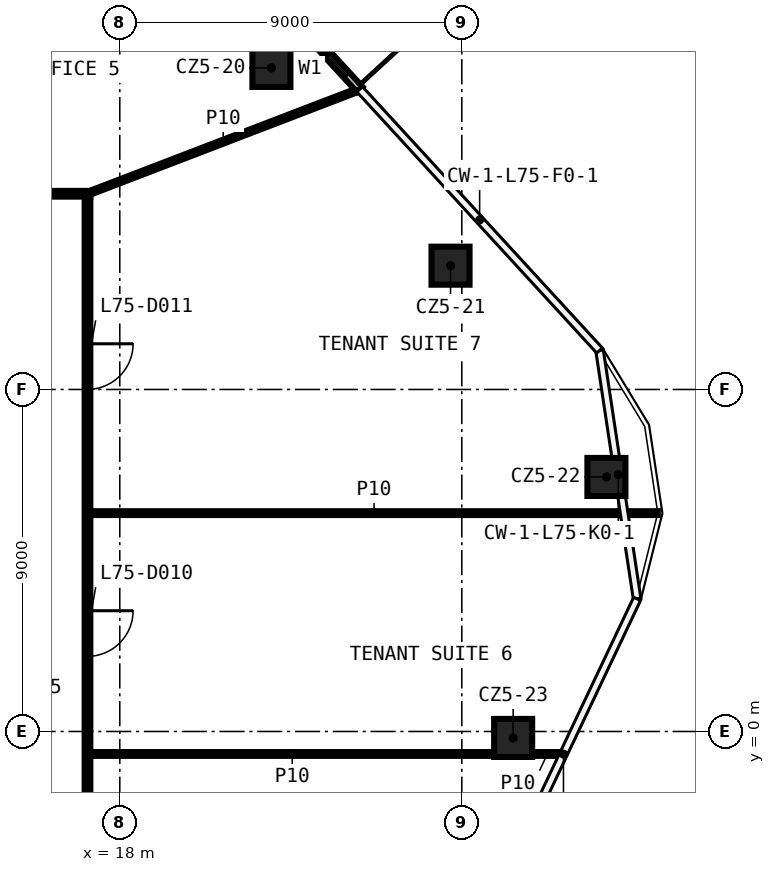
"""IFC4 building model, lengths in metres.
Left out: names, types, materials, properties, quantities, classifications, styles, units other than length and angle.
Written with IfcOpenShell. Run it as: python <this file> out.ifc"""

import sys

from ifc_helpers import new_model, si_unit, direction, frame, frame_2d, origin, origin_2d, place, context, subcontext, project, spatial, rectangle, extrude, element, fill, save


model = new_model("IFC4")
c1 = context("Model", 3, precision=1e-05, world=origin(), true_north=direction((0.0, 1.0)))
c2 = subcontext(c1, "Body", "Model", "MODEL_VIEW")
j1 = project(units=[si_unit("LENGTHUNIT", "METRE"), si_unit("PLANEANGLEUNIT", "RADIAN")], contexts=[c1])
p1 = place(None, origin())
s1 = spatial("IfcSite", under=j1, at=p1, CompositionType="ELEMENT")
p2 = place(p1, origin())
s2 = spatial("IfcBuilding", under=s1, at=p2, CompositionType="ELEMENT")
p3 = place(p2, frame((0.0, 0.0, 348.8)))
s3 = spatial("IfcBuildingStorey", under=s2, at=p3, CompositionType="ELEMENT", Elevation=348.8)
for number, where, z_axis, x_axis in (
    (1, (21.99, 17.462, 0.0), (0.0, 0.0, 1.0), (1.0, 0.0, 0.0)),
    (2, (26.703, 12.257, 0.0), (0.0, 0.0, 1.0), (1.0, 0.0, 0.0)),
    (3, (30.805, 6.698, 0.0), (0.0, 0.0, 1.0), (1.0, 0.0, 0.0)),
    (4, (28.351, -0.17, 0.0), (0.0, 0.0, 1.0), (1.0, 0.0, 0.0)),
):
    element("IfcColumn", number, at=place(p3, frame(where, z_axis=z_axis, x_axis=x_axis)), inside=s3, PredefinedType="COLUMN", context=c2, shape_type="SweptSolid", body=[
        extrude(rectangle(XDim=1.0, YDim=1.0, at=origin_2d()), origin(), (0.0, 0.0, 1.0), 3.7),
    ])
p4 = place(p3, frame((17.225, -0.592, 0.0), z_axis=(0.0, 0.0, 1.0), x_axis=(1.0, 0.0, 0.0)))
e5 = element("IfcWall", 5, at=p4, inside=s3, PredefinedType="PARTITIONING", context=c2, shape_type="SweptSolid", body=[
    extrude(rectangle(XDim=10.626, YDim=0.1, at=frame_2d((5.313, 0.0))), origin(), (0.0, 0.0, 1.0), 3.7),
])
p5 = place(p3, frame((28.851, -0.592, 0.0), z_axis=(0.0, 0.0, 1.0), x_axis=(1.0, 0.0, 0.0)))
e6 = element("IfcWall", 6, at=p5, inside=s3, PredefinedType="PARTITIONING", context=c2, shape_type="SweptSolid", body=[
    extrude(rectangle(XDim=0.803, YDim=0.1, at=frame_2d((0.402, 0.0))), origin(), (0.0, 0.0, 1.0), 3.7),
])
p6 = place(p3, frame((17.225, 5.746, 0.0), z_axis=(0.0, 0.0, 1.0), x_axis=(1.0, 0.0, 0.0)))
e7 = element("IfcWall", 7, at=p6, inside=s3, PredefinedType="PARTITIONING", context=c2, shape_type="SweptSolid", body=[
    extrude(rectangle(XDim=14.931, YDim=0.1, at=frame_2d((7.466, 0.0))), origin(), (0.0, 0.0, 1.0), 3.7),
])
p7 = place(p3, frame((-17.225, 14.15, 0.0), z_axis=(0.0, 0.0, 1.0), x_axis=(1.0, 0.0, 0.0)))
e8 = element("IfcWall", 8, at=p7, inside=s3, PredefinedType="PARTITIONING", context=c2, shape_type="SweptSolid", body=[
    extrude(rectangle(XDim=34.45, YDim=0.15, at=frame_2d((17.225, 0.0))), origin(), (0.0, 0.0, 1.0), 3.7),
])
p8 = place(p7, frame((31.19, 0.0, 0.0)))
e9 = element("IfcOpeningElement", 9, at=p8, cuts=e8, PredefinedType="OPENING", context=c2, shape_type="SweptSolid", body=[
    extrude(rectangle(XDim=1.2, YDim=2.1, at=frame_2d((0.6, 1.05))), frame((0.0, 0.085, 0.0), z_axis=(0.0, -1.0, 0.0), x_axis=(1.0, 0.0, 0.0)), (0.0, 0.0, 1.0), 0.17),
])
p9 = place(p7, frame((24.621, 0.0, 0.0)))
e10 = element("IfcOpeningElement", 10, at=p9, cuts=e8, PredefinedType="OPENING", context=c2, shape_type="SweptSolid", body=[
    extrude(rectangle(XDim=1.2, YDim=2.1, at=frame_2d((0.6, 1.05))), frame((0.0, 0.085, 0.0), z_axis=(0.0, -1.0, 0.0), x_axis=(1.0, 0.0, 0.0)), (0.0, 0.0, 1.0), 0.17),
])
p10 = place(p7, frame((17.703, 0.0, 0.0)))
e11 = element("IfcOpeningElement", 11, at=p10, cuts=e8, PredefinedType="OPENING", context=c2, shape_type="SweptSolid", body=[
    extrude(rectangle(XDim=1.2, YDim=2.1, at=frame_2d((0.6, 1.05))), frame((0.0, 0.085, 0.0), z_axis=(0.0, -1.0, 0.0), x_axis=(1.0, 0.0, 0.0)), (0.0, 0.0, 1.0), 0.17),
])
p11 = place(p7, frame((10.781, 0.0, 0.0)))
e12 = element("IfcOpeningElement", 12, at=p11, cuts=e8, PredefinedType="OPENING", context=c2, shape_type="SweptSolid", body=[
    extrude(rectangle(XDim=1.2, YDim=2.1, at=frame_2d((0.6, 1.05))), frame((0.0, 0.085, 0.0), z_axis=(0.0, -1.0, 0.0), x_axis=(1.0, 0.0, 0.0)), (0.0, 0.0, 1.0), 0.17),
])
p12 = place(p7, frame((6.171, 0.0, 0.0)))
e13 = element("IfcOpeningElement", 13, at=p12, cuts=e8, PredefinedType="OPENING", context=c2, shape_type="SweptSolid", body=[
    extrude(rectangle(XDim=1.2, YDim=2.1, at=frame_2d((0.6, 1.05))), frame((0.0, 0.085, 0.0), z_axis=(0.0, -1.0, 0.0), x_axis=(1.0, 0.0, 0.0)), (0.0, 0.0, 1.0), 0.17),
])
p13 = place(p7, frame((1.932, 0.0, 0.0)))
e14 = element("IfcOpeningElement", 14, at=p13, cuts=e8, PredefinedType="OPENING", context=c2, shape_type="SweptSolid", body=[
    extrude(rectangle(XDim=1.2, YDim=2.1, at=frame_2d((0.6, 1.05))), frame((0.0, 0.085, 0.0), z_axis=(0.0, -1.0, 0.0), x_axis=(1.0, 0.0, 0.0)), (0.0, 0.0, 1.0), 0.17),
])
p14 = place(p3, frame((17.15, 14.15, 0.0), z_axis=(0.0, 0.0, 1.0), x_axis=(0.933641376905, 0.358209127927, 0.0)))
e15 = element("IfcWall", 15, at=p14, inside=s3, PredefinedType="PARTITIONING", context=c2, shape_type="SweptSolid", body=[
    extrude(rectangle(XDim=7.65, YDim=0.1, at=frame_2d((3.825, 0.0))), origin(), (0.0, 0.0, 1.0), 3.7),
])
p15 = place(p3, frame((17.15, 14.075, 0.0), z_axis=(0.0, 0.0, 1.0), x_axis=(0.0, -1.0, 0.0)))
e16 = element("IfcWall", 16, at=p15, inside=s3, PredefinedType="PARTITIONING", context=c2, shape_type="SweptSolid", body=[
    extrude(rectangle(XDim=28.15, YDim=0.15, at=frame_2d((14.075, 0.0))), origin(), (0.0, 0.0, 1.0), 3.7),
])
p16 = place(p15, frame((24.292, 0.0, 0.0)))
e17 = element("IfcOpeningElement", 17, at=p16, cuts=e16, PredefinedType="OPENING", context=c2, shape_type="SweptSolid", body=[
    extrude(rectangle(XDim=1.2, YDim=2.1, at=frame_2d((0.6, 1.05))), frame((0.0, 0.085, 0.0), z_axis=(0.0, -1.0, 0.0), x_axis=(1.0, 0.0, 0.0)), (0.0, 0.0, 1.0), 0.17),
])
p17 = place(p15, frame((10.898, 0.0, 0.0)))
e18 = element("IfcOpeningElement", 18, at=p17, cuts=e16, PredefinedType="OPENING", context=c2, shape_type="SweptSolid", body=[
    extrude(rectangle(XDim=1.2, YDim=2.1, at=frame_2d((0.6, 1.05))), frame((0.0, 0.085, 0.0), z_axis=(0.0, -1.0, 0.0), x_axis=(1.0, 0.0, 0.0)), (0.0, 0.0, 1.0), 0.17),
])
p18 = place(p15, frame((3.873, 0.0, 0.0)))
e19 = element("IfcOpeningElement", 19, at=p18, cuts=e16, PredefinedType="OPENING", context=c2, shape_type="SweptSolid", body=[
    extrude(rectangle(XDim=1.2, YDim=2.1, at=frame_2d((0.6, 1.05))), frame((0.0, 0.085, 0.0), z_axis=(0.0, -1.0, 0.0), x_axis=(1.0, 0.0, 0.0)), (0.0, 0.0, 1.0), 0.17),
])
p19 = place(p3, frame((24.313, 16.898, 0.0), z_axis=(0.0, 0.0, 1.0), x_axis=(-0.676360611012, 0.736570650971, 0.0)))
e20 = element("IfcWall", 20, at=p19, inside=s3, PredefinedType="SOLIDWALL", context=c2, shape_type="SweptSolid", body=[
    extrude(rectangle(XDim=14.005, YDim=0.2, at=frame_2d((7.003, 0.0))), origin(), (0.0, 0.0, 1.0), 3.7),
])
p20 = place(p19, frame((0.5, 0.0, 0.6)))
e21 = element("IfcOpeningElement", 21, at=p20, cuts=e20, PredefinedType="OPENING", context=c2, shape_type="SweptSolid", body=[
    extrude(rectangle(XDim=1.6, YDim=2.4, at=frame_2d((0.8, 1.2))), frame((0.0, 0.11, 0.0), z_axis=(0.0, -1.0, 0.0), x_axis=(1.0, 0.0, 0.0)), (0.0, 0.0, 1.0), 0.22),
])
p21 = place(p19, frame((2.8, 0.0, 0.0)))
e22 = element("IfcOpeningElement", 22, at=p21, cuts=e20, PredefinedType="OPENING", context=c2, shape_type="SweptSolid", body=[
    extrude(rectangle(XDim=1.2, YDim=2.4, at=frame_2d((0.6, 1.2))), frame((0.0, 0.11, 0.0), z_axis=(0.0, -1.0, 0.0), x_axis=(1.0, 0.0, 0.0)), (0.0, 0.0, 1.0), 0.22),
])
p22 = place(p19, frame((6.668, 0.0, 0.6)))
e23 = element("IfcOpeningElement", 23, at=p22, cuts=e20, PredefinedType="OPENING", context=c2, shape_type="SweptSolid", body=[
    extrude(rectangle(XDim=1.6, YDim=2.4, at=frame_2d((0.8, 1.2))), frame((0.0, 0.11, 0.0), z_axis=(0.0, -1.0, 0.0), x_axis=(1.0, 0.0, 0.0)), (0.0, 0.0, 1.0), 0.22),
])
p23 = place(p19, frame((5.168, 0.0, 0.0)))
e24 = element("IfcOpeningElement", 24, at=p23, cuts=e20, PredefinedType="OPENING", context=c2, shape_type="SweptSolid", body=[
    extrude(rectangle(XDim=1.2, YDim=2.4, at=frame_2d((0.6, 1.2))), frame((0.0, 0.11, 0.0), z_axis=(0.0, -1.0, 0.0), x_axis=(1.0, 0.0, 0.0)), (0.0, 0.0, 1.0), 0.22),
])
p24 = place(p19, frame((11.337, 0.0, 0.6)))
e25 = element("IfcOpeningElement", 25, at=p24, cuts=e20, PredefinedType="OPENING", context=c2, shape_type="SweptSolid", body=[
    extrude(rectangle(XDim=1.6, YDim=2.4, at=frame_2d((0.8, 1.2))), frame((0.0, 0.11, 0.0), z_axis=(0.0, -1.0, 0.0), x_axis=(1.0, 0.0, 0.0)), (0.0, 0.0, 1.0), 0.22),
])
p25 = place(p19, frame((9.837, 0.0, 0.0)))
e26 = element("IfcOpeningElement", 26, at=p25, cuts=e20, PredefinedType="OPENING", context=c2, shape_type="SweptSolid", body=[
    extrude(rectangle(XDim=1.2, YDim=2.4, at=frame_2d((0.6, 1.2))), frame((0.0, 0.11, 0.0), z_axis=(0.0, -1.0, 0.0), x_axis=(1.0, 0.0, 0.0)), (0.0, 0.0, 1.0), 0.22),
])
p26 = place(p17, origin())
e27 = element("IfcDoor", 27, at=p26, inside=s3, OperationType="SINGLE_SWING_LEFT", PredefinedType="DOOR", context=c2, shape_type="SweptSolid", body=[
    extrude(rectangle(XDim=1.2, YDim=2.1, at=frame_2d((0.6, 1.05))), frame((0.0, 0.025, 0.0), z_axis=(0.0, -1.0, 0.0), x_axis=(1.0, 0.0, 0.0)), (0.0, 0.0, 1.0), 0.05),
])
fill(e18, e27)
p27 = place(p18, origin())
e28 = element("IfcDoor", 28, at=p27, inside=s3, OperationType="SINGLE_SWING_RIGHT", PredefinedType="DOOR", context=c2, shape_type="SweptSolid", body=[
    extrude(rectangle(XDim=1.2, YDim=2.1, at=frame_2d((0.6, 1.05))), frame((0.0, 0.025, 0.0), z_axis=(0.0, -1.0, 0.0), x_axis=(1.0, 0.0, 0.0)), (0.0, 0.0, 1.0), 0.05),
])
fill(e19, e28)
p28 = place(p20, origin())
e29 = element("IfcWindow", 29, at=p28, inside=s3, PartitioningType="SINGLE_PANEL", PredefinedType="WINDOW", context=c2, shape_type="SweptSolid", body=[
    extrude(rectangle(XDim=1.6, YDim=2.4, at=frame_2d((0.8, 1.2))), frame((0.0, 0.03, 0.0), z_axis=(0.0, -1.0, 0.0), x_axis=(1.0, 0.0, 0.0)), (0.0, 0.0, 1.0), 0.06),
])
fill(e21, e29)
save(model, sys.argv[1])
